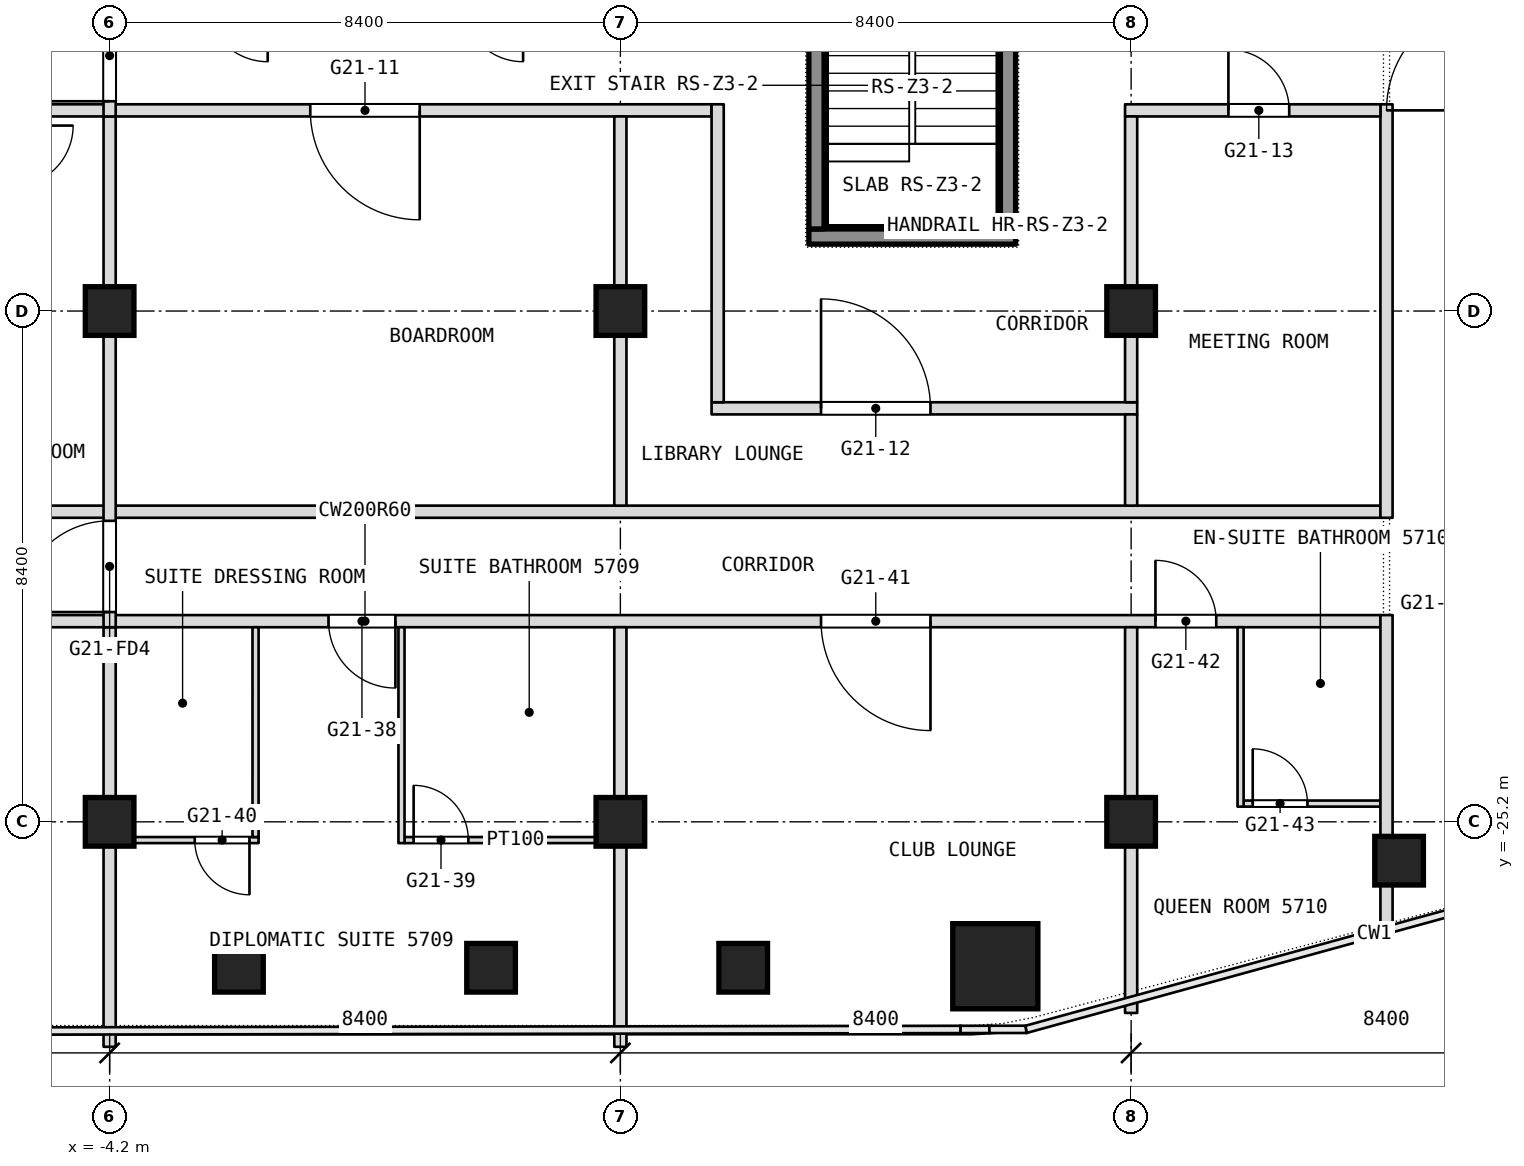
"""IFC4 building model, lengths in metres.
Left out: names, types, materials, properties, quantities, classifications, styles, units other than length and angle.
Written with IfcOpenShell. Run it as: python <this file> out.ifc"""

import sys

from ifc_helpers import new_model, si_unit, direction, frame, frame_2d, origin, origin_2d, place, context, subcontext, project, spatial, rectangle, extrude, element, fill, save


model = new_model("IFC4")
c1 = context("Model", 3, precision=1e-05, world=origin(), true_north=direction((0.0, 1.0)))
c2 = subcontext(c1, "Body", "Model", "MODEL_VIEW")
j1 = project(units=[si_unit("LENGTHUNIT", "METRE"), si_unit("PLANEANGLEUNIT", "RADIAN")], contexts=[c1])
p1 = place(None, origin())
s1 = spatial("IfcSite", under=j1, at=p1, CompositionType="ELEMENT")
p2 = place(p1, origin())
s2 = spatial("IfcBuilding", under=s1, at=p2, CompositionType="ELEMENT")
p3 = place(p2, frame((0.0, 0.0, 241.7)))
s3 = spatial("IfcBuildingStorey", under=s2, at=p3, CompositionType="ELEMENT", Elevation=241.7)
p4 = place(p3, frame((10.366, -27.575, 0.0), z_axis=(0.0, 0.0, 1.0), x_axis=(1.0, 0.0, 0.0)))
e1 = element("IfcColumn", 1, at=p4, inside=s3, PredefinedType="COLUMN", context=c2, shape_type="SweptSolid", body=[
    extrude(rectangle(XDim=1.4, YDim=1.4, at=origin_2d()), origin(), (0.0, 0.0, 1.0), 3.6),
])
for number, where, z_axis, x_axis in (
    (2, (-4.2, -25.2, 0.0), (0.0, 0.0, 1.0), (1.0, 0.0, 0.0)),
    (3, (-4.2, -16.8, 0.0), (0.0, 0.0, 1.0), (1.0, 0.0, 0.0)),
    (4, (4.2, -25.2, 0.0), (0.0, 0.0, 1.0), (1.0, 0.0, 0.0)),
    (5, (4.2, -16.8, 0.0), (0.0, 0.0, 1.0), (1.0, 0.0, 0.0)),
    (6, (12.6, -25.2, 0.0), (0.0, 0.0, 1.0), (1.0, 0.0, 0.0)),
    (7, (12.6, -16.8, 0.0), (0.0, 0.0, 1.0), (1.0, 0.0, 0.0)),
    (8, (17.007, -25.839, 0.0), (0.0, 0.0, 1.0), (1.0, 0.0, 0.0)),
    (9, (6.22, -27.6, 0.0), (0.0, 0.0, 1.0), (1.0, 0.0, 0.0)),
    (10, (2.073, -27.6, 0.0), (0.0, 0.0, 1.0), (1.0, 0.0, 0.0)),
    (11, (-2.073, -27.6, 0.0), (0.0, 0.0, 1.0), (1.0, 0.0, 0.0)),
):
    element("IfcColumn", number, at=place(p3, frame(where, z_axis=z_axis, x_axis=x_axis)), inside=s3, PredefinedType="COLUMN", context=c2, shape_type="SweptSolid", body=[
        extrude(rectangle(XDim=0.8, YDim=0.8, at=origin_2d()), origin(), (0.0, 0.0, 1.0), 3.6),
    ])
p5 = place(p3, frame((-4.1, -25.5, 0.0), z_axis=(0.0, 0.0, 1.0), x_axis=(1.0, 0.0, 0.0)))
e12 = element("IfcWall", 12, at=p5, inside=s3, PredefinedType="PARTITIONING", context=c2, shape_type="SweptSolid", body=[
    extrude(rectangle(XDim=2.35, YDim=0.1, at=frame_2d((1.175, 0.0))), origin(), (0.0, 0.0, 1.0), 3.34),
])
p6 = place(p5, frame((1.3, 0.0, 0.0)))
e13 = element("IfcOpeningElement", 13, at=p6, cuts=e12, PredefinedType="OPENING", context=c2, shape_type="SweptSolid", body=[
    extrude(rectangle(XDim=0.9, YDim=2.1, at=frame_2d((0.45, 1.05))), frame((0.0, 0.05, 0.0), z_axis=(0.0, -1.0, 0.0), x_axis=(1.0, 0.0, 0.0)), (0.0, 0.0, 1.0), 0.1),
])
p7 = place(p3, frame((0.65, -25.5, 0.0), z_axis=(0.0, 0.0, 1.0), x_axis=(1.0, 0.0, 0.0)))
e14 = element("IfcWall", 14, at=p7, inside=s3, PredefinedType="PARTITIONING", context=c2, shape_type="SweptSolid", body=[
    extrude(rectangle(XDim=3.65, YDim=0.1, at=frame_2d((1.825, 0.0))), origin(), (0.0, 0.0, 1.0), 3.34),
])
p8 = place(p7, frame((0.15, 0.0, 0.0)))
e15 = element("IfcOpeningElement", 15, at=p8, cuts=e14, PredefinedType="OPENING", context=c2, shape_type="SweptSolid", body=[
    extrude(rectangle(XDim=0.9, YDim=2.1, at=frame_2d((0.45, 1.05))), frame((0.0, 0.05, 0.0), z_axis=(0.0, -1.0, 0.0), x_axis=(1.0, 0.0, 0.0)), (0.0, 0.0, 1.0), 0.1),
])
p9 = place(p3, frame((14.45, -24.9, 0.0), z_axis=(0.0, 0.0, 1.0), x_axis=(1.0, 0.0, 0.0)))
e16 = element("IfcWall", 16, at=p9, inside=s3, PredefinedType="PARTITIONING", context=c2, shape_type="SweptSolid", body=[
    extrude(rectangle(XDim=2.25, YDim=0.1, at=frame_2d((1.125, 0.0))), origin(), (0.0, 0.0, 1.0), 3.34),
])
p10 = place(p9, frame((0.15, 0.0, 0.0)))
e17 = element("IfcOpeningElement", 17, at=p10, cuts=e16, PredefinedType="OPENING", context=c2, shape_type="SweptSolid", body=[
    extrude(rectangle(XDim=0.9, YDim=2.1, at=frame_2d((0.45, 1.05))), frame((0.0, 0.05, 0.0), z_axis=(0.0, -1.0, 0.0), x_axis=(1.0, 0.0, 0.0)), (0.0, 0.0, 1.0), 0.1),
])
p11 = place(p3, frame((-16.7, -21.9, 0.0), z_axis=(0.0, 0.0, 1.0), x_axis=(1.0, 0.0, 0.0)))
e18 = element("IfcWall", 18, at=p11, inside=s3, PredefinedType="PARTITIONING", context=c2, shape_type="SweptSolid", body=[
    extrude(rectangle(XDim=33.4, YDim=0.2, at=frame_2d((16.7, 0.0))), origin(), (0.0, 0.0, 1.0), 3.34),
])
p12 = place(p11, frame((0.3, 0.0, 0.0)))
e19 = element("IfcOpeningElement", 19, at=p12, cuts=e18, PredefinedType="OPENING", context=c2, shape_type="SweptSolid", body=[
    extrude(rectangle(XDim=1.0, YDim=2.1, at=frame_2d((0.5, 1.05))), frame((0.0, 0.1, 0.0), z_axis=(0.0, -1.0, 0.0), x_axis=(1.0, 0.0, 0.0)), (0.0, 0.0, 1.0), 0.2),
])
p13 = place(p11, frame((9.85, 0.0, 0.0)))
e20 = element("IfcOpeningElement", 20, at=p13, cuts=e18, PredefinedType="OPENING", context=c2, shape_type="SweptSolid", body=[
    extrude(rectangle(XDim=1.1, YDim=2.1, at=frame_2d((0.55, 1.05))), frame((0.0, 0.1, 0.0), z_axis=(0.0, -1.0, 0.0), x_axis=(1.0, 0.0, 0.0)), (0.0, 0.0, 1.0), 0.2),
])
p14 = place(p11, frame((16.1, 0.0, 0.0)))
e21 = element("IfcOpeningElement", 21, at=p14, cuts=e18, PredefinedType="OPENING", context=c2, shape_type="SweptSolid", body=[
    extrude(rectangle(XDim=1.1, YDim=2.1, at=frame_2d((0.55, 1.05))), frame((0.0, 0.1, 0.0), z_axis=(0.0, -1.0, 0.0), x_axis=(1.0, 0.0, 0.0)), (0.0, 0.0, 1.0), 0.2),
])
p15 = place(p11, frame((24.2, 0.0, 0.0)))
e22 = element("IfcOpeningElement", 22, at=p15, cuts=e18, PredefinedType="OPENING", context=c2, shape_type="SweptSolid", body=[
    extrude(rectangle(XDim=1.8, YDim=2.1, at=frame_2d((0.9, 1.05))), frame((0.0, 0.1, 0.0), z_axis=(0.0, -1.0, 0.0), x_axis=(1.0, 0.0, 0.0)), (0.0, 0.0, 1.0), 0.2),
])
p16 = place(p11, frame((29.7, 0.0, 0.0)))
e23 = element("IfcOpeningElement", 23, at=p16, cuts=e18, PredefinedType="OPENING", context=c2, shape_type="SweptSolid", body=[
    extrude(rectangle(XDim=1.0, YDim=2.1, at=frame_2d((0.5, 1.05))), frame((0.0, 0.1, 0.0), z_axis=(0.0, -1.0, 0.0), x_axis=(1.0, 0.0, 0.0)), (0.0, 0.0, 1.0), 0.2),
])
p17 = place(p3, frame((-16.7, -20.1, 0.0), z_axis=(0.0, 0.0, 1.0), x_axis=(1.0, 0.0, 0.0)))
e24 = element("IfcWall", 24, at=p17, inside=s3, PredefinedType="PARTITIONING", context=c2, shape_type="SweptSolid", body=[
    extrude(rectangle(XDim=33.4, YDim=0.2, at=frame_2d((16.7, 0.0))), origin(), (0.0, 0.0, 1.0), 3.34),
])
p18 = place(p3, frame((5.7, -18.4, 0.0), z_axis=(0.0, 0.0, 1.0), x_axis=(1.0, 0.0, 0.0)))
e25 = element("IfcWall", 25, at=p18, inside=s3, PredefinedType="PARTITIONING", context=c2, shape_type="SweptSolid", body=[
    extrude(rectangle(XDim=7.0, YDim=0.2, at=frame_2d((3.5, 0.0))), origin(), (0.0, 0.0, 1.0), 3.34),
])
p19 = place(p18, frame((1.8, 0.0, 0.0)))
e26 = element("IfcOpeningElement", 26, at=p19, cuts=e25, PredefinedType="OPENING", context=c2, shape_type="SweptSolid", body=[
    extrude(rectangle(XDim=1.8, YDim=2.1, at=frame_2d((0.9, 1.05))), frame((0.0, 0.1, 0.0), z_axis=(0.0, -1.0, 0.0), x_axis=(1.0, 0.0, 0.0)), (0.0, 0.0, 1.0), 0.2),
])
p20 = place(p3, frame((16.8, -27.229, 0.0), z_axis=(0.0, 0.0, 1.0), x_axis=(0.0, 1.0, 0.0)))
e27 = element("IfcWall", 27, at=p20, inside=s3, PredefinedType="PARTITIONING", context=c2, shape_type="SweptSolid", body=[
    extrude(rectangle(XDim=5.429, YDim=0.2, at=frame_2d((2.714, 0.0))), origin(), (0.0, 0.0, 1.0), 3.34),
])
p21 = place(p3, frame((16.8, -20.2, 0.0), z_axis=(0.0, 0.0, 1.0), x_axis=(0.0, 1.0, 0.0)))
e28 = element("IfcWall", 28, at=p21, inside=s3, PredefinedType="PARTITIONING", context=c2, shape_type="SweptSolid", body=[
    extrude(rectangle(XDim=6.8, YDim=0.2, at=frame_2d((3.4, 0.0))), origin(), (0.0, 0.0, 1.0), 3.34),
])
p22 = place(p3, frame((14.4, -24.95, 0.0), z_axis=(0.0, 0.0, 1.0), x_axis=(0.0, 1.0, 0.0)))
e29 = element("IfcWall", 29, at=p22, inside=s3, PredefinedType="PARTITIONING", context=c2, shape_type="SweptSolid", body=[
    extrude(rectangle(XDim=2.95, YDim=0.1, at=frame_2d((1.475, 0.0))), origin(), (0.0, 0.0, 1.0), 3.34),
])
p23 = place(p3, frame((-5.9, -13.5, 0.0), z_axis=(0.0, 0.0, 1.0), x_axis=(1.0, 0.0, 0.0)))
e30 = element("IfcWall", 30, at=p23, inside=s3, PredefinedType="PARTITIONING", context=c2, shape_type="SweptSolid", body=[
    extrude(rectangle(XDim=11.6, YDim=0.2, at=frame_2d((5.8, 0.0))), origin(), (0.0, 0.0, 1.0), 3.34),
])
p24 = place(p23, frame((5.0, 0.0, 0.0)))
e31 = element("IfcOpeningElement", 31, at=p24, cuts=e30, PredefinedType="OPENING", context=c2, shape_type="SweptSolid", body=[
    extrude(rectangle(XDim=1.8, YDim=2.1, at=frame_2d((0.9, 1.05))), frame((0.0, 0.1, 0.0), z_axis=(0.0, -1.0, 0.0), x_axis=(1.0, 0.0, 0.0)), (0.0, 0.0, 1.0), 0.2),
])
p25 = place(p3, frame((12.5, -13.5, 0.0), z_axis=(0.0, 0.0, 1.0), x_axis=(1.0, 0.0, 0.0)))
e32 = element("IfcWall", 32, at=p25, inside=s3, PredefinedType="PARTITIONING", context=c2, shape_type="SweptSolid", body=[
    extrude(rectangle(XDim=4.2, YDim=0.2, at=frame_2d((2.1, 0.0))), origin(), (0.0, 0.0, 1.0), 3.34),
])
p26 = place(p25, frame((1.7, 0.0, 0.0)))
e33 = element("IfcOpeningElement", 33, at=p26, cuts=e32, PredefinedType="OPENING", context=c2, shape_type="SweptSolid", body=[
    extrude(rectangle(XDim=1.0, YDim=2.1, at=frame_2d((0.5, 1.05))), frame((0.0, 0.1, 0.0), z_axis=(0.0, -1.0, 0.0), x_axis=(1.0, 0.0, 0.0)), (0.0, 0.0, 1.0), 0.2),
])
p27 = place(p3, frame((12.6, -28.343, 0.0), z_axis=(0.0, 0.0, 1.0), x_axis=(0.0, 1.0, 0.0)))
e34 = element("IfcWall", 34, at=p27, inside=s3, PredefinedType="PARTITIONING", context=c2, shape_type="SweptSolid", body=[
    extrude(rectangle(XDim=6.343, YDim=0.2, at=frame_2d((3.171, 0.0))), origin(), (0.0, 0.0, 1.0), 3.34),
])
p28 = place(p3, frame((12.6, -20.0, 0.0), z_axis=(0.0, 0.0, 1.0), x_axis=(0.0, 1.0, 0.0)))
e35 = element("IfcWall", 35, at=p28, inside=s3, PredefinedType="PARTITIONING", context=c2, shape_type="SweptSolid", body=[
    extrude(rectangle(XDim=1.5, YDim=0.2, at=frame_2d((0.75, 0.0))), origin(), (0.0, 0.0, 1.0), 3.34),
])
p29 = place(p3, frame((12.6, -18.3, 0.0), z_axis=(0.0, 0.0, 1.0), x_axis=(0.0, 1.0, 0.0)))
e36 = element("IfcWall", 36, at=p29, inside=s3, PredefinedType="PARTITIONING", context=c2, shape_type="SweptSolid", body=[
    extrude(rectangle(XDim=4.7, YDim=0.2, at=frame_2d((2.35, 0.0))), origin(), (0.0, 0.0, 1.0), 3.34),
])
p30 = place(p3, frame((5.8, -18.3, 0.0), z_axis=(0.0, 0.0, 1.0), x_axis=(0.0, 1.0, 0.0)))
e37 = element("IfcWall", 37, at=p30, inside=s3, PredefinedType="PARTITIONING", context=c2, shape_type="SweptSolid", body=[
    extrude(rectangle(XDim=4.9, YDim=0.2, at=frame_2d((2.45, 0.0))), origin(), (0.0, 0.0, 1.0), 3.34),
])
p31 = place(p3, frame((4.2, -28.9, 0.0), z_axis=(0.0, 0.0, 1.0), x_axis=(0.0, 1.0, 0.0)))
e38 = element("IfcWall", 38, at=p31, inside=s3, PredefinedType="PARTITIONING", context=c2, shape_type="SweptSolid", body=[
    extrude(rectangle(XDim=6.9, YDim=0.2, at=frame_2d((3.45, 0.0))), origin(), (0.0, 0.0, 1.0), 3.34),
])
p32 = place(p3, frame((4.2, -20.0, 0.0), z_axis=(0.0, 0.0, 1.0), x_axis=(0.0, 1.0, 0.0)))
e39 = element("IfcWall", 39, at=p32, inside=s3, PredefinedType="PARTITIONING", context=c2, shape_type="SweptSolid", body=[
    extrude(rectangle(XDim=6.4, YDim=0.2, at=frame_2d((3.2, 0.0))), origin(), (0.0, 0.0, 1.0), 3.34),
])
p33 = place(p3, frame((0.6, -25.55, 0.0), z_axis=(0.0, 0.0, 1.0), x_axis=(0.0, 1.0, 0.0)))
e40 = element("IfcWall", 40, at=p33, inside=s3, PredefinedType="PARTITIONING", context=c2, shape_type="SweptSolid", body=[
    extrude(rectangle(XDim=3.55, YDim=0.1, at=frame_2d((1.775, 0.0))), origin(), (0.0, 0.0, 1.0), 3.34),
])
p34 = place(p3, frame((-1.8, -25.45, 0.0), z_axis=(0.0, 0.0, 1.0), x_axis=(0.0, 1.0, 0.0)))
e41 = element("IfcWall", 41, at=p34, inside=s3, PredefinedType="PARTITIONING", context=c2, shape_type="SweptSolid", body=[
    extrude(rectangle(XDim=3.45, YDim=0.1, at=frame_2d((1.725, 0.0))), origin(), (0.0, 0.0, 1.0), 3.34),
])
p35 = place(p3, frame((-4.2, -28.9, 0.0), z_axis=(0.0, 0.0, 1.0), x_axis=(0.0, 1.0, 0.0)))
e42 = element("IfcWall", 42, at=p35, inside=s3, PredefinedType="PARTITIONING", context=c2, shape_type="SweptSolid", body=[
    extrude(rectangle(XDim=6.9, YDim=0.2, at=frame_2d((3.45, 0.0))), origin(), (0.0, 0.0, 1.0), 3.34),
])
p36 = place(p3, frame((-4.2, -22.0, 0.0), z_axis=(0.0, 0.0, 1.0), x_axis=(0.0, 1.0, 0.0)))
e43 = element("IfcWall", 43, at=p36, inside=s3, PredefinedType="PARTITIONING", context=c2, shape_type="SweptSolid", body=[
    extrude(rectangle(XDim=8.4, YDim=0.2, at=frame_2d((4.2, 0.0))), origin(), (0.0, 0.0, 1.0), 3.34),
])
p37 = place(p36, frame((0.25, 0.0, 0.0)))
e44 = element("IfcOpeningElement", 44, at=p37, cuts=e43, PredefinedType="OPENING", context=c2, shape_type="SweptSolid", body=[
    extrude(rectangle(XDim=1.5, YDim=2.1, at=frame_2d((0.75, 1.05))), frame((0.0, 0.1, 0.0), z_axis=(0.0, -1.0, 0.0), x_axis=(1.0, 0.0, 0.0)), (0.0, 0.0, 1.0), 0.2),
])
p38 = place(p3, frame((-4.2, -13.6, 0.0), z_axis=(0.0, 0.0, 1.0), x_axis=(0.0, 1.0, 0.0)))
e45 = element("IfcWall", 45, at=p38, inside=s3, PredefinedType="PARTITIONING", context=c2, shape_type="SweptSolid", body=[
    extrude(rectangle(XDim=13.6, YDim=0.2, at=frame_2d((6.8, 0.0))), origin(), (0.0, 0.0, 1.0), 3.34),
])
p39 = place(p38, frame((11.95, 0.0, 0.0)))
e46 = element("IfcOpeningElement", 46, at=p39, cuts=e45, PredefinedType="OPENING", context=c2, shape_type="SweptSolid", body=[
    extrude(rectangle(XDim=1.5, YDim=2.1, at=frame_2d((0.75, 1.05))), frame((0.0, 0.1, 0.0), z_axis=(0.0, -1.0, 0.0), x_axis=(1.0, 0.0, 0.0)), (0.0, 0.0, 1.0), 0.2),
])
p40 = place(p38, frame((0.25, 0.0, 0.0)))
e47 = element("IfcOpeningElement", 47, at=p40, cuts=e45, PredefinedType="OPENING", context=c2, shape_type="SweptSolid", body=[
    extrude(rectangle(XDim=1.5, YDim=2.1, at=frame_2d((0.75, 1.05))), frame((0.0, 0.1, 0.0), z_axis=(0.0, -1.0, 0.0), x_axis=(1.0, 0.0, 0.0)), (0.0, 0.0, 1.0), 0.2),
])
p41 = place(p3, frame((7.3, -15.575, 0.1), z_axis=(0.0, 0.0, 1.0), x_axis=(1.0, 0.0, 0.0)))
e48 = element("IfcWall", 48, at=p41, inside=s3, PredefinedType="SHEAR", context=c2, shape_type="SweptSolid", body=[
    extrude(rectangle(XDim=3.4, YDim=0.25, at=frame_2d((1.7, 0.0))), origin(), (0.0, 0.0, 1.0), 3.6),
])
for number, where, z_axis, x_axis in (
    (49, (7.425, -15.45, 0.1), (0.0, 0.0, 1.0), (0.0, 1.0, 0.0)),
    (50, (10.575, -15.45, 0.1), (0.0, 0.0, 1.0), (0.0, 1.0, 0.0)),
):
    element("IfcWall", number, at=place(p3, frame(where, z_axis=z_axis, x_axis=x_axis)), inside=s3, PredefinedType="SHEAR", context=c2, shape_type="SweptSolid", body=[
        extrude(rectangle(XDim=5.7, YDim=0.25, at=frame_2d((2.85, 0.0))), origin(), (0.0, 0.0, 1.0), 3.6),
    ])
p42 = place(p6, origin())
e51 = element("IfcDoor", 51, at=p42, inside=s3, OperationType="SINGLE_SWING_RIGHT", PredefinedType="DOOR", context=c2, shape_type="SweptSolid", body=[
    extrude(rectangle(XDim=0.9, YDim=2.1, at=frame_2d((0.45, 1.05))), frame((0.0, 0.025, 0.0), z_axis=(0.0, -1.0, 0.0), x_axis=(1.0, 0.0, 0.0)), (0.0, 0.0, 1.0), 0.05),
])
fill(e13, e51)
p43 = place(p8, origin())
e52 = element("IfcDoor", 52, at=p43, inside=s3, OperationType="SINGLE_SWING_LEFT", PredefinedType="DOOR", context=c2, shape_type="SweptSolid", body=[
    extrude(rectangle(XDim=0.9, YDim=2.1, at=frame_2d((0.45, 1.05))), frame((0.0, 0.025, 0.0), z_axis=(0.0, -1.0, 0.0), x_axis=(1.0, 0.0, 0.0)), (0.0, 0.0, 1.0), 0.05),
])
fill(e15, e52)
p44 = place(p10, origin())
e53 = element("IfcDoor", 53, at=p44, inside=s3, OperationType="SINGLE_SWING_LEFT", PredefinedType="DOOR", context=c2, shape_type="SweptSolid", body=[
    extrude(rectangle(XDim=0.9, YDim=2.1, at=frame_2d((0.45, 1.05))), frame((0.0, 0.025, 0.0), z_axis=(0.0, -1.0, 0.0), x_axis=(1.0, 0.0, 0.0)), (0.0, 0.0, 1.0), 0.05),
])
fill(e17, e53)
p45 = place(p14, origin())
e54 = element("IfcDoor", 54, at=p45, inside=s3, OperationType="SINGLE_SWING_LEFT", PredefinedType="DOOR", context=c2, shape_type="SweptSolid", body=[
    extrude(rectangle(XDim=1.1, YDim=2.1, at=frame_2d((0.55, 1.05))), frame((0.0, 0.025, 0.0), z_axis=(0.0, -1.0, 0.0), x_axis=(1.0, 0.0, 0.0)), (0.0, 0.0, 1.0), 0.05),
])
fill(e21, e54)
p46 = place(p15, origin())
e55 = element("IfcDoor", 55, at=p46, inside=s3, OperationType="DOUBLE_DOOR_SINGLE_SWING", PredefinedType="DOOR", context=c2, shape_type="SweptSolid", body=[
    extrude(rectangle(XDim=1.8, YDim=2.1, at=frame_2d((0.9, 1.05))), frame((0.0, 0.025, 0.0), z_axis=(0.0, -1.0, 0.0), x_axis=(1.0, 0.0, 0.0)), (0.0, 0.0, 1.0), 0.05),
])
fill(e22, e55)
p47 = place(p16, origin())
e56 = element("IfcDoor", 56, at=p47, inside=s3, OperationType="SINGLE_SWING_RIGHT", PredefinedType="DOOR", context=c2, shape_type="SweptSolid", body=[
    extrude(rectangle(XDim=1.0, YDim=2.1, at=frame_2d((0.5, 1.05))), frame((0.0, 0.025, 0.0), z_axis=(0.0, -1.0, 0.0), x_axis=(1.0, 0.0, 0.0)), (0.0, 0.0, 1.0), 0.05),
])
fill(e23, e56)
p48 = place(p19, origin())
e57 = element("IfcDoor", 57, at=p48, inside=s3, OperationType="DOUBLE_DOOR_SINGLE_SWING", PredefinedType="DOOR", context=c2, shape_type="SweptSolid", body=[
    extrude(rectangle(XDim=1.8, YDim=2.1, at=frame_2d((0.9, 1.05))), frame((0.0, 0.025, 0.0), z_axis=(0.0, -1.0, 0.0), x_axis=(1.0, 0.0, 0.0)), (0.0, 0.0, 1.0), 0.05),
])
fill(e26, e57)
p49 = place(p24, origin())
e58 = element("IfcDoor", 58, at=p49, inside=s3, OperationType="DOUBLE_DOOR_SINGLE_SWING", PredefinedType="DOOR", context=c2, shape_type="SweptSolid", body=[
    extrude(rectangle(XDim=1.8, YDim=2.1, at=frame_2d((0.9, 1.05))), frame((0.0, 0.025, 0.0), z_axis=(0.0, -1.0, 0.0), x_axis=(1.0, 0.0, 0.0)), (0.0, 0.0, 1.0), 0.05),
])
fill(e31, e58)
p50 = place(p26, origin())
e59 = element("IfcDoor", 59, at=p50, inside=s3, OperationType="SINGLE_SWING_LEFT", PredefinedType="DOOR", context=c2, shape_type="SweptSolid", body=[
    extrude(rectangle(XDim=1.0, YDim=2.1, at=frame_2d((0.5, 1.05))), frame((0.0, 0.025, 0.0), z_axis=(0.0, -1.0, 0.0), x_axis=(1.0, 0.0, 0.0)), (0.0, 0.0, 1.0), 0.05),
])
fill(e33, e59)
p51 = place(p40, origin())
e60 = element("IfcDoor", 60, at=p51, inside=s3, OperationType="DOUBLE_DOOR_DOUBLE_SWING", PredefinedType="DOOR", context=c2, shape_type="SweptSolid", body=[
    extrude(rectangle(XDim=1.5, YDim=2.1, at=frame_2d((0.75, 1.05))), frame((0.0, 0.025, 0.0), z_axis=(0.0, -1.0, 0.0), x_axis=(1.0, 0.0, 0.0)), (0.0, 0.0, 1.0), 0.05),
])
fill(e47, e60)
p52 = place(p37, origin())
e61 = element("IfcDoor", 61, at=p52, inside=s3, OperationType="DOUBLE_DOOR_DOUBLE_SWING", PredefinedType="DOOR", context=c2, shape_type="SweptSolid", body=[
    extrude(rectangle(XDim=1.5, YDim=2.1, at=frame_2d((0.75, 1.05))), frame((0.0, 0.025, 0.0), z_axis=(0.0, -1.0, 0.0), x_axis=(1.0, 0.0, 0.0)), (0.0, 0.0, 1.0), 0.05),
])
fill(e44, e61)
save(model, sys.argv[1])
